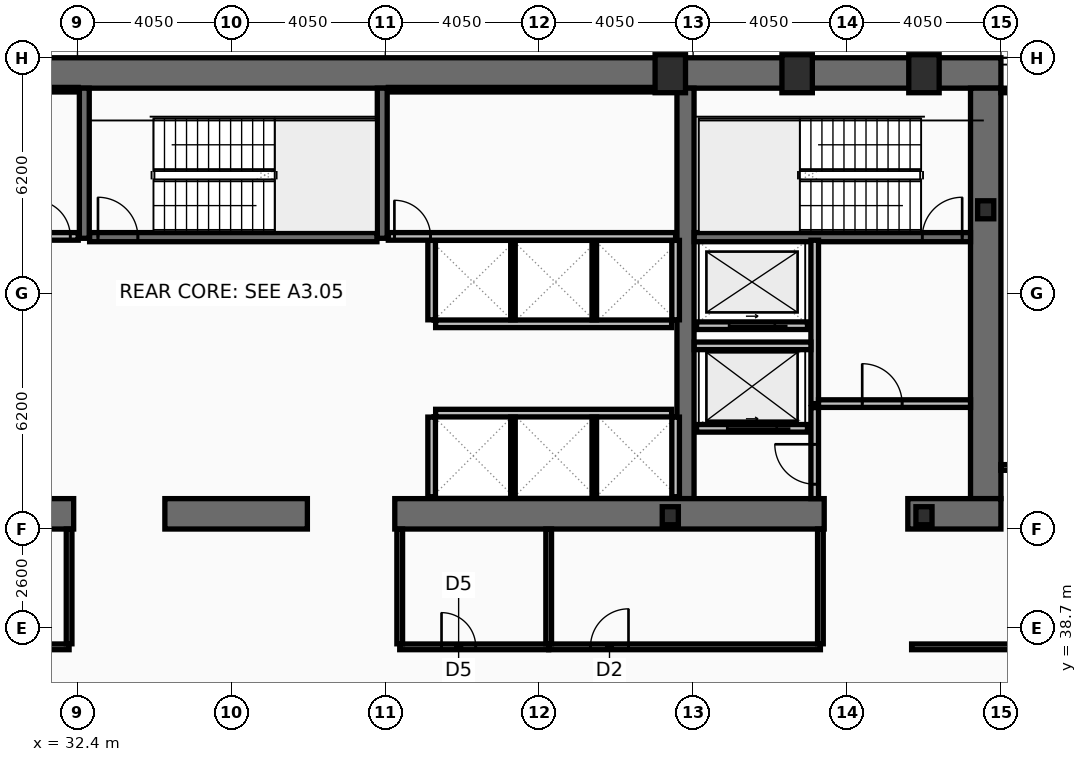
"""IFC4 building model, lengths in metres.
Left out: names, types, materials, properties, quantities, classifications, styles, units other than length and angle.
Written with IfcOpenShell. Run it as: python <this file> out.ifc"""

import sys

from ifc_helpers import new_model, si_unit, direction, frame, frame_2d, origin, origin_2d, place, context, subcontext, project, spatial, rectangle, hollow_rectangle, i_section, extrude, element, fill, save


model = new_model("IFC4")
c1 = context("Model", 3, precision=1e-05, world=origin(), true_north=direction((0.0, 1.0)))
c2 = subcontext(c1, "Body", "Model", "MODEL_VIEW")
j1 = project(units=[si_unit("LENGTHUNIT", "METRE"), si_unit("PLANEANGLEUNIT", "RADIAN")], contexts=[c1])
p1 = place(None, origin())
s1 = spatial("IfcSite", under=j1, at=p1, CompositionType="ELEMENT")
p2 = place(p1, origin())
s2 = spatial("IfcBuilding", under=s1, at=p2, CompositionType="ELEMENT")
p3 = place(p2, frame((0.0, 0.0, 29.8)))
s3 = spatial("IfcBuildingStorey", under=s2, at=p3, CompositionType="ELEMENT", Elevation=29.8)
p4 = place(p3, frame((16.2, 53.3, 0.0), z_axis=(0.0, 0.0, 1.0), x_axis=(1.0, 0.0, 0.0)))
e1 = element("IfcWall", 1, at=p4, inside=s3, PredefinedType="SHEAR", context=c2, shape_type="SweptSolid", body=[
    extrude(rectangle(XDim=40.5, YDim=0.8, at=frame_2d((20.25, 0.0))), origin(), (0.0, 0.0, 1.0), 3.82),
])
p5 = place(p3, frame((56.3, 52.9, 0.0), z_axis=(0.0, 0.0, 1.0), x_axis=(0.0, -1.0, 0.0)))
e2 = element("IfcWall", 2, at=p5, inside=s3, PredefinedType="SHEAR", context=c2, shape_type="SweptSolid", body=[
    extrude(rectangle(XDim=10.8, YDim=0.8, at=frame_2d((5.4, 0.0))), origin(), (0.0, 0.0, 1.0), 3.82),
])
p6 = place(p3, frame((48.4, 42.1, 0.0), z_axis=(0.0, 0.0, 1.0), x_axis=(0.0, 1.0, 0.0)))
e3 = element("IfcWall", 3, at=p6, inside=s3, PredefinedType="SHEAR", context=c2, shape_type="SweptSolid", body=[
    extrude(rectangle(XDim=10.8, YDim=0.45, at=frame_2d((5.4, 0.0))), origin(), (0.0, 0.0, 1.0), 3.82),
])
p7 = place(p3, frame((32.3, 41.7, 0.0), z_axis=(0.0, 0.0, 1.0), x_axis=(-1.0, 0.0, 0.0)))
e4 = element("IfcWall", 4, at=p7, inside=s3, PredefinedType="SHEAR", context=c2, shape_type="SweptSolid", body=[
    extrude(rectangle(XDim=11.45, YDim=0.8, at=frame_2d((5.725, 0.0))), origin(), (0.0, 0.0, 1.0), 3.82),
])
p8 = place(p3, frame((38.45, 41.7, 0.0), z_axis=(0.0, 0.0, 1.0), x_axis=(-1.0, 0.0, 0.0)))
e5 = element("IfcWall", 5, at=p8, inside=s3, PredefinedType="SHEAR", context=c2, shape_type="SweptSolid", body=[
    extrude(rectangle(XDim=3.75, YDim=0.8, at=frame_2d((1.875, 0.0))), origin(), (0.0, 0.0, 1.0), 3.82),
])
p9 = place(p3, frame((52.05, 41.7, 0.0), z_axis=(0.0, 0.0, 1.0), x_axis=(-1.0, 0.0, 0.0)))
e6 = element("IfcWall", 6, at=p9, inside=s3, PredefinedType="SHEAR", context=c2, shape_type="SweptSolid", body=[
    extrude(rectangle(XDim=11.3, YDim=0.8, at=frame_2d((5.65, 0.0))), origin(), (0.0, 0.0, 1.0), 3.82),
])
p10 = place(p3, frame((56.7, 41.7, 0.0), z_axis=(0.0, 0.0, 1.0), x_axis=(-1.0, 0.0, 0.0)))
e7 = element("IfcWall", 7, at=p10, inside=s3, PredefinedType="SHEAR", context=c2, shape_type="SweptSolid", body=[
    extrude(rectangle(XDim=2.45, YDim=0.8, at=frame_2d((1.225, 0.0))), origin(), (0.0, 0.0, 1.0), 3.82),
])
for number, where, z_axis, x_axis in (
    (8, (32.58, 48.95, 0.0), (0.0, 0.0, 1.0), (0.0, 1.0, 0.0)),
    (9, (40.42, 48.95, 0.0), (0.0, 0.0, 1.0), (0.0, 1.0, 0.0)),
):
    element("IfcWall", number, at=place(p3, frame(where, z_axis=z_axis, x_axis=x_axis)), inside=s3, PredefinedType="SHEAR", context=c2, shape_type="SweptSolid", body=[
        extrude(rectangle(XDim=3.95, YDim=0.26, at=frame_2d((1.975, 0.0))), origin(), (0.0, 0.0, 1.0), 3.82),
    ])
p11 = place(p3, frame((48.63, 48.98, 0.0), z_axis=(0.0, 0.0, 1.0), x_axis=(1.0, 0.0, 0.0)))
e10 = element("IfcWall", 10, at=p11, inside=s3, PredefinedType="SHEAR", context=c2, shape_type="SweptSolid", body=[
    extrude(rectangle(XDim=7.27, YDim=0.24, at=frame_2d((3.635, 0.0))), origin(), (0.0, 0.0, 1.0), 3.82),
])
p12 = place(p11, frame((6.0, 0.0, 0.0)))
e11 = element("IfcOpeningElement", 11, at=p12, cuts=e10, PredefinedType="OPENING", context=c2, shape_type="SweptSolid", body=[
    extrude(rectangle(XDim=1.05, YDim=2.15, at=frame_2d((0.525, 1.075))), frame((0.0, 0.13, 0.0), z_axis=(0.0, -1.0, 0.0), x_axis=(1.0, 0.0, 0.0)), (0.0, 0.0, 1.0), 0.26),
])
p13 = place(p3, frame((32.72, 48.98, 0.0), z_axis=(0.0, 0.0, 1.0), x_axis=(1.0, 0.0, 0.0)))
e12 = element("IfcWall", 12, at=p13, inside=s3, PredefinedType="SHEAR", context=c2, shape_type="SweptSolid", body=[
    extrude(rectangle(XDim=7.56, YDim=0.24, at=frame_2d((3.78, 0.0))), origin(), (0.0, 0.0, 1.0), 3.82),
])
p14 = place(p13, frame((0.22, 0.0, 0.0)))
e13 = element("IfcOpeningElement", 13, at=p14, cuts=e12, PredefinedType="OPENING", context=c2, shape_type="SweptSolid", body=[
    extrude(rectangle(XDim=1.05, YDim=2.15, at=frame_2d((0.525, 1.075))), frame((0.0, 0.13, 0.0), z_axis=(0.0, -1.0, 0.0), x_axis=(1.0, 0.0, 0.0)), (0.0, 0.0, 1.0), 0.26),
])
for number, where, z_axis, x_axis in (
    (14, (48.0, 53.28, 0.0), (0.0, 0.0, 1.0), (1.0, 0.0, 0.0)),
    (15, (51.337, 53.28, 0.0), (0.0, 0.0, 1.0), (1.0, 0.0, 0.0)),
    (16, (54.675, 53.28, 0.0), (0.0, 0.0, 1.0), (1.0, 0.0, 0.0)),
):
    element("IfcColumn", number, at=place(p3, frame(where, z_axis=z_axis, x_axis=x_axis)), inside=s3, PredefinedType="COLUMN", context=c2, shape_type="SweptSolid", body=[
        extrude(hollow_rectangle(XDim=0.8, YDim=1.0, WallThickness=0.055, at=origin_2d()), origin(), (0.0, 0.0, 1.0), 4.0),
    ])
for number, where, z_axis, x_axis in (
    (17, (56.3, 49.7, 0.0), (0.0, 0.0, 1.0), (1.0, 0.0, 0.0)),
    (18, (48.0, 41.65, 0.0), (0.0, 0.0, 1.0), (1.0, 0.0, 0.0)),
    (19, (54.675, 41.65, 0.0), (0.0, 0.0, 1.0), (1.0, 0.0, 0.0)),
):
    element("IfcColumn", number, at=place(p3, frame(where, z_axis=z_axis, x_axis=x_axis)), inside=s3, PredefinedType="COLUMN", context=c2, shape_type="SweptSolid", body=[
        extrude(i_section(OverallWidth=0.424, OverallDepth=0.474, WebThickness=0.048, FlangeThickness=0.077, at=origin_2d()), origin(), (0.0, 0.0, 1.0), 4.0),
    ])
p15 = place(p3, frame((51.61, 43.95, 0.0), z_axis=(0.0, 0.0, 1.0), x_axis=(-1.0, 0.0, 0.0)))
e20 = element("IfcWall", 20, at=p15, inside=s3, PredefinedType="PARTITIONING", context=c2, shape_type="SweptSolid", body=[
    extrude(rectangle(XDim=2.92, YDim=0.2, at=frame_2d((1.46, 0.0))), origin(), (0.0, 0.0, 1.0), 3.82),
])
p16 = place(p15, frame((0.81, 0.0, 0.0)))
e21 = element("IfcOpeningElement", 21, at=p16, cuts=e20, PredefinedType="OPENING", context=c2, shape_type="SweptSolid", body=[
    extrude(rectangle(XDim=1.3, YDim=2.18, at=frame_2d((0.65, 1.09))), frame((0.0, 0.11, 0.0), z_axis=(0.0, -1.0, 0.0), x_axis=(1.0, 0.0, 0.0)), (0.0, 0.0, 1.0), 0.22),
])
p17 = place(p3, frame((51.61, 46.65, 0.0), z_axis=(0.0, 0.0, 1.0), x_axis=(-1.0, 0.0, 0.0)))
e22 = element("IfcWall", 22, at=p17, inside=s3, PredefinedType="PARTITIONING", context=c2, shape_type="SweptSolid", body=[
    extrude(rectangle(XDim=2.92, YDim=0.2, at=frame_2d((1.46, 0.0))), origin(), (0.0, 0.0, 1.0), 3.82),
])
p18 = place(p17, frame((0.86, 0.0, 0.0)))
e23 = element("IfcOpeningElement", 23, at=p18, cuts=e22, PredefinedType="OPENING", context=c2, shape_type="SweptSolid", body=[
    extrude(rectangle(XDim=1.2, YDim=2.18, at=frame_2d((0.6, 1.09))), frame((0.0, 0.11, 0.0), z_axis=(0.0, -1.0, 0.0), x_axis=(1.0, 0.0, 0.0)), (0.0, 0.0, 1.0), 0.22),
])
p19 = place(p3, frame((51.8, 44.6, 0.0), z_axis=(0.0, 0.0, 1.0), x_axis=(0.0, 1.0, 0.0)))
e24 = element("IfcWall", 24, at=p19, inside=s3, PredefinedType="PARTITIONING", context=c2, shape_type="SweptSolid", body=[
    extrude(rectangle(XDim=4.3, YDim=0.2, at=frame_2d((2.15, 0.0))), origin(), (0.0, 0.0, 1.0), 3.82),
])
p20 = place(p3, frame((51.9, 44.6, 0.0), z_axis=(0.0, 0.0, 1.0), x_axis=(1.0, 0.0, 0.0)))
e25 = element("IfcWall", 25, at=p20, inside=s3, PredefinedType="PARTITIONING", context=c2, shape_type="SweptSolid", body=[
    extrude(rectangle(XDim=4.0, YDim=0.2, at=frame_2d((2.0, 0.0))), origin(), (0.0, 0.0, 1.0), 3.82),
])
p21 = place(p20, frame((1.15, 0.0, 0.0)))
e26 = element("IfcOpeningElement", 26, at=p21, cuts=e25, PredefinedType="OPENING", context=c2, shape_type="SweptSolid", body=[
    extrude(rectangle(XDim=1.05, YDim=2.15, at=frame_2d((0.525, 1.075))), frame((0.0, 0.11, 0.0), z_axis=(0.0, -1.0, 0.0), x_axis=(1.0, 0.0, 0.0)), (0.0, 0.0, 1.0), 0.22),
])
p22 = place(p3, frame((48.63, 46.12, 0.0), z_axis=(0.0, 0.0, 1.0), x_axis=(1.0, 0.0, 0.0)))
e27 = element("IfcWall", 27, at=p22, inside=s3, PredefinedType="PARTITIONING", context=c2, shape_type="SweptSolid", body=[
    extrude(rectangle(XDim=3.07, YDim=0.2, at=frame_2d((1.535, 0.0))), origin(), (0.0, 0.0, 1.0), 3.82),
])
p23 = place(p3, frame((51.8, 42.1, 0.0), z_axis=(0.0, 0.0, 1.0), x_axis=(0.0, 1.0, 0.0)))
e28 = element("IfcWall", 28, at=p23, inside=s3, PredefinedType="PARTITIONING", context=c2, shape_type="SweptSolid", body=[
    extrude(rectangle(XDim=2.395, YDim=0.2, at=frame_2d((1.198, 0.0))), origin(), (0.0, 0.0, 1.0), 3.82),
])
p24 = place(p23, frame((0.38, 0.0, 0.0)))
e29 = element("IfcOpeningElement", 29, at=p24, cuts=e28, PredefinedType="OPENING", context=c2, shape_type="SweptSolid", body=[
    extrude(rectangle(XDim=1.05, YDim=2.15, at=frame_2d((0.525, 1.075))), frame((0.0, 0.11, 0.0), z_axis=(0.0, -1.0, 0.0), x_axis=(1.0, 0.0, 0.0)), (0.0, 0.0, 1.0), 0.22),
])
p25 = place(p3, frame((41.825, 46.7, 0.0), z_axis=(0.0, 0.0, 1.0), x_axis=(1.0, 0.0, 0.0)))
e30 = element("IfcWall", 30, at=p25, inside=s3, PredefinedType="PARTITIONING", context=c2, shape_type="SweptSolid", body=[
    extrude(rectangle(XDim=6.21, YDim=0.2, at=frame_2d((3.105, 0.0))), origin(), (0.0, 0.0, 1.0), 3.82),
])
for number, where, z_axis, x_axis in (
    (31, (41.72, 46.805, 0.0), (0.0, 0.0, 1.0), (0.0, 1.0, 0.0)),
    (32, (48.14, 46.805, 0.0), (0.0, 0.0, 1.0), (0.0, 1.0, 0.0)),
):
    element("IfcWall", number, at=place(p3, frame(where, z_axis=z_axis, x_axis=x_axis)), inside=s3, PredefinedType="PARTITIONING", context=c2, shape_type="SweptSolid", body=[
        extrude(rectangle(XDim=2.09, YDim=0.2, at=frame_2d((1.045, 0.0))), origin(), (0.0, 0.0, 1.0), 3.82),
    ])
for number, where, z_axis, x_axis in (
    (33, (43.86, 46.805, 0.0), (0.0, 0.0, 1.0), (0.0, 1.0, 0.0)),
    (34, (46.0, 46.805, 0.0), (0.0, 0.0, 1.0), (0.0, 1.0, 0.0)),
):
    element("IfcWall", number, at=place(p3, frame(where, z_axis=z_axis, x_axis=x_axis)), inside=s3, PredefinedType="PARTITIONING", context=c2, shape_type="SweptSolid", body=[
        extrude(rectangle(XDim=2.09, YDim=0.12, at=frame_2d((1.045, 0.0))), origin(), (0.0, 0.0, 1.0), 3.82),
    ])
p26 = place(p3, frame((41.825, 44.35, 0.0), z_axis=(0.0, 0.0, 1.0), x_axis=(1.0, 0.0, 0.0)))
e35 = element("IfcWall", 35, at=p26, inside=s3, PredefinedType="PARTITIONING", context=c2, shape_type="SweptSolid", body=[
    extrude(rectangle(XDim=6.21, YDim=0.2, at=frame_2d((3.105, 0.0))), origin(), (0.0, 0.0, 1.0), 3.82),
])
for number, where, z_axis, x_axis in (
    (36, (41.72, 42.15, 0.0), (0.0, 0.0, 1.0), (0.0, 1.0, 0.0)),
    (37, (48.14, 42.15, 0.0), (0.0, 0.0, 1.0), (0.0, 1.0, 0.0)),
):
    element("IfcWall", number, at=place(p3, frame(where, z_axis=z_axis, x_axis=x_axis)), inside=s3, PredefinedType="PARTITIONING", context=c2, shape_type="SweptSolid", body=[
        extrude(rectangle(XDim=2.095, YDim=0.2, at=frame_2d((1.048, 0.0))), origin(), (0.0, 0.0, 1.0), 3.82),
    ])
for number, where, z_axis, x_axis in (
    (38, (43.86, 42.15, 0.0), (0.0, 0.0, 1.0), (0.0, 1.0, 0.0)),
    (39, (46.0, 42.15, 0.0), (0.0, 0.0, 1.0), (0.0, 1.0, 0.0)),
):
    element("IfcWall", number, at=place(p3, frame(where, z_axis=z_axis, x_axis=x_axis)), inside=s3, PredefinedType="PARTITIONING", context=c2, shape_type="SweptSolid", body=[
        extrude(rectangle(XDim=2.095, YDim=0.12, at=frame_2d((1.048, 0.0))), origin(), (0.0, 0.0, 1.0), 3.82),
    ])
p27 = place(p3, frame((24.7, 52.86, 0.0), z_axis=(0.0, 0.0, 1.0), x_axis=(1.0, 0.0, 0.0)))
e40 = element("IfcWall", 40, at=p27, inside=s3, PredefinedType="PARTITIONING", context=c2, shape_type="SweptSolid", body=[
    extrude(rectangle(XDim=7.72, YDim=0.12, at=frame_2d((3.86, 0.0))), origin(), (0.0, 0.0, 1.0), 3.82),
])
p28 = place(p3, frame((24.7, 49.0, 0.0), z_axis=(0.0, 0.0, 1.0), x_axis=(1.0, 0.0, 0.0)))
e41 = element("IfcWall", 41, at=p28, inside=s3, PredefinedType="PARTITIONING", context=c2, shape_type="SweptSolid", body=[
    extrude(rectangle(XDim=7.72, YDim=0.2, at=frame_2d((3.86, 0.0))), origin(), (0.0, 0.0, 1.0), 3.82),
])
p29 = place(p28, frame((6.56, 0.0, 0.0)))
e42 = element("IfcOpeningElement", 42, at=p29, cuts=e41, PredefinedType="OPENING", context=c2, shape_type="SweptSolid", body=[
    extrude(rectangle(XDim=0.95, YDim=2.1, at=frame_2d((0.475, 1.05))), frame((0.0, 0.11, 0.0), z_axis=(0.0, -1.0, 0.0), x_axis=(1.0, 0.0, 0.0)), (0.0, 0.0, 1.0), 0.22),
])
p30 = place(p3, frame((40.58, 52.86, 0.0), z_axis=(0.0, 0.0, 1.0), x_axis=(1.0, 0.0, 0.0)))
e43 = element("IfcWall", 43, at=p30, inside=s3, PredefinedType="PARTITIONING", context=c2, shape_type="SweptSolid", body=[
    extrude(rectangle(XDim=7.56, YDim=0.12, at=frame_2d((3.78, 0.0))), origin(), (0.0, 0.0, 1.0), 3.82),
])
p31 = place(p3, frame((40.58, 49.0, 0.0), z_axis=(0.0, 0.0, 1.0), x_axis=(1.0, 0.0, 0.0)))
e44 = element("IfcWall", 44, at=p31, inside=s3, PredefinedType="PARTITIONING", context=c2, shape_type="SweptSolid", body=[
    extrude(rectangle(XDim=7.56, YDim=0.2, at=frame_2d((3.78, 0.0))), origin(), (0.0, 0.0, 1.0), 3.82),
])
p32 = place(p31, frame((0.16, 0.0, 0.0)))
e45 = element("IfcOpeningElement", 45, at=p32, cuts=e44, PredefinedType="OPENING", context=c2, shape_type="SweptSolid", body=[
    extrude(rectangle(XDim=0.95, YDim=2.1, at=frame_2d((0.475, 1.05))), frame((0.0, 0.11, 0.0), z_axis=(0.0, -1.0, 0.0), x_axis=(1.0, 0.0, 0.0)), (0.0, 0.0, 1.0), 0.22),
])
p33 = place(p3, frame((28.4, 38.2, 0.0), z_axis=(0.0, 0.0, 1.0), x_axis=(1.0, 0.0, 0.0)))
e46 = element("IfcWall", 46, at=p33, inside=s3, PredefinedType="PARTITIONING", context=c2, shape_type="SweptSolid", body=[
    extrude(rectangle(XDim=3.78, YDim=0.15, at=frame_2d((1.89, 0.0))), origin(), (0.0, 0.0, 1.0), 3.01),
])
p34 = place(p33, frame((0.7, 0.0, 0.0)))
e47 = element("IfcOpeningElement", 47, at=p34, cuts=e46, PredefinedType="OPENING", context=c2, shape_type="SweptSolid", body=[
    extrude(rectangle(XDim=0.95, YDim=2.05, at=frame_2d((0.475, 1.025))), frame((0.0, 0.085, 0.0), z_axis=(0.0, -1.0, 0.0), x_axis=(1.0, 0.0, 0.0)), (0.0, 0.0, 1.0), 0.17),
])
p35 = place(p3, frame((32.18, 38.28, 0.0), z_axis=(0.0, 0.0, 1.0), x_axis=(0.0, 1.0, 0.0)))
e48 = element("IfcWall", 48, at=p35, inside=s3, PredefinedType="PARTITIONING", context=c2, shape_type="SweptSolid", body=[
    extrude(rectangle(XDim=3.02, YDim=0.15, at=frame_2d((1.51, 0.0))), origin(), (0.0, 0.0, 1.0), 3.82),
])
p36 = place(p3, frame((40.88, 38.2, 0.0), z_axis=(0.0, 0.0, 1.0), x_axis=(1.0, 0.0, 0.0)))
e49 = element("IfcWall", 49, at=p36, inside=s3, PredefinedType="PARTITIONING", context=c2, shape_type="SweptSolid", body=[
    extrude(rectangle(XDim=3.92, YDim=0.15, at=frame_2d((1.96, 0.0))), origin(), (0.0, 0.0, 1.0), 3.01),
])
p37 = place(p36, frame((1.1, 0.0, 0.0)))
e50 = element("IfcOpeningElement", 50, at=p37, cuts=e49, PredefinedType="OPENING", context=c2, shape_type="SweptSolid", body=[
    extrude(rectangle(XDim=0.9, YDim=2.05, at=frame_2d((0.45, 1.025))), frame((0.0, 0.085, 0.0), z_axis=(0.0, -1.0, 0.0), x_axis=(1.0, 0.0, 0.0)), (0.0, 0.0, 1.0), 0.17),
])
p38 = place(p3, frame((44.8, 38.2, 0.0), z_axis=(0.0, 0.0, 1.0), x_axis=(1.0, 0.0, 0.0)))
e51 = element("IfcWall", 51, at=p38, inside=s3, PredefinedType="PARTITIONING", context=c2, shape_type="SweptSolid", body=[
    extrude(rectangle(XDim=7.15, YDim=0.15, at=frame_2d((3.575, 0.0))), origin(), (0.0, 0.0, 1.0), 3.01),
])
p39 = place(p38, frame((1.1, 0.0, 0.0)))
e52 = element("IfcOpeningElement", 52, at=p39, cuts=e51, PredefinedType="OPENING", context=c2, shape_type="SweptSolid", body=[
    extrude(rectangle(XDim=1.0, YDim=2.05, at=frame_2d((0.5, 1.025))), frame((0.0, 0.085, 0.0), z_axis=(0.0, -1.0, 0.0), x_axis=(1.0, 0.0, 0.0)), (0.0, 0.0, 1.0), 0.17),
])
for number, where, z_axis, x_axis in (
    (53, (40.88, 38.28, 0.0), (0.0, 0.0, 1.0), (0.0, 1.0, 0.0)),
    (54, (44.8, 38.28, 0.0), (0.0, 0.0, 1.0), (0.0, 1.0, 0.0)),
    (55, (51.95, 38.28, 0.0), (0.0, 0.0, 1.0), (0.0, 1.0, 0.0)),
):
    element("IfcWall", number, at=place(p3, frame(where, z_axis=z_axis, x_axis=x_axis)), inside=s3, PredefinedType="PARTITIONING", context=c2, shape_type="SweptSolid", body=[
        extrude(rectangle(XDim=3.02, YDim=0.15, at=frame_2d((1.51, 0.0))), origin(), (0.0, 0.0, 1.0), 3.82),
    ])
p40 = place(p3, frame((54.35, 38.2, 0.0), z_axis=(0.0, 0.0, 1.0), x_axis=(1.0, 0.0, 0.0)))
e56 = element("IfcWall", 56, at=p40, inside=s3, PredefinedType="PARTITIONING", context=c2, shape_type="SweptSolid", body=[
    extrude(rectangle(XDim=16.52, YDim=0.15, at=frame_2d((8.26, 0.0))), origin(), (0.0, 0.0, 1.0), 3.01),
])
p41 = place(p40, frame((3.25, 0.0, 0.0)))
e57 = element("IfcOpeningElement", 57, at=p41, cuts=e56, PredefinedType="OPENING", context=c2, shape_type="SweptSolid", body=[
    extrude(rectangle(XDim=0.95, YDim=2.05, at=frame_2d((0.475, 1.025))), frame((0.0, 0.085, 0.0), z_axis=(0.0, -1.0, 0.0), x_axis=(1.0, 0.0, 0.0)), (0.0, 0.0, 1.0), 0.17),
])
p42 = place(p3, frame((56.7, 42.92, 0.0), z_axis=(0.0, 0.0, 1.0), x_axis=(1.0, 0.0, 0.0)))
e58 = element("IfcWall", 58, at=p42, inside=s3, PredefinedType="PARTITIONING", context=c2, shape_type="SweptSolid", body=[
    extrude(rectangle(XDim=14.105, YDim=0.15, at=frame_2d((7.052, 0.0))), origin(), (0.0, 0.0, 1.0), 3.01),
])
p43 = place(p42, frame((0.9, 0.0, 0.0)))
e59 = element("IfcOpeningElement", 59, at=p43, cuts=e58, PredefinedType="OPENING", context=c2, shape_type="SweptSolid", body=[
    extrude(rectangle(XDim=0.9, YDim=2.05, at=frame_2d((0.45, 1.025))), frame((0.0, 0.085, 0.0), z_axis=(0.0, -1.0, 0.0), x_axis=(1.0, 0.0, 0.0)), (0.0, 0.0, 1.0), 0.17),
])
p44 = place(p3, frame((56.7, 52.84, 0.0), z_axis=(0.0, 0.0, 1.0), x_axis=(1.0, 0.0, 0.0)))
e60 = element("IfcWall", 60, at=p44, inside=s3, PredefinedType="PARTITIONING", context=c2, shape_type="SweptSolid", body=[
    extrude(rectangle(XDim=14.105, YDim=0.12, at=frame_2d((7.052, 0.0))), origin(), (0.0, 0.0, 1.0), 3.82),
])
p45 = place(p12, origin())
e61 = element("IfcDoor", 61, at=p45, inside=s3, OperationType="SINGLE_SWING_RIGHT", PredefinedType="DOOR", context=c2, shape_type="SweptSolid", body=[
    extrude(rectangle(XDim=1.05, YDim=2.15, at=frame_2d((0.525, 1.075))), frame((0.0, 0.025, 0.0), z_axis=(0.0, -1.0, 0.0), x_axis=(1.0, 0.0, 0.0)), (0.0, 0.0, 1.0), 0.05),
])
fill(e11, e61)
p46 = place(p14, origin())
e62 = element("IfcDoor", 62, at=p46, inside=s3, OperationType="SINGLE_SWING_LEFT", PredefinedType="DOOR", context=c2, shape_type="SweptSolid", body=[
    extrude(rectangle(XDim=1.05, YDim=2.15, at=frame_2d((0.525, 1.075))), frame((0.0, 0.025, 0.0), z_axis=(0.0, -1.0, 0.0), x_axis=(1.0, 0.0, 0.0)), (0.0, 0.0, 1.0), 0.05),
])
fill(e13, e62)
p47 = place(p16, origin())
e63 = element("IfcDoor", 63, at=p47, inside=s3, OperationType="SLIDING_TO_LEFT", PredefinedType="DOOR", context=c2, shape_type="SweptSolid", body=[
    extrude(rectangle(XDim=1.3, YDim=2.18, at=frame_2d((0.65, 1.09))), frame((0.0, 0.025, 0.0), z_axis=(0.0, -1.0, 0.0), x_axis=(1.0, 0.0, 0.0)), (0.0, 0.0, 1.0), 0.05),
])
fill(e21, e63)
p48 = place(p18, origin())
e64 = element("IfcDoor", 64, at=p48, inside=s3, OperationType="SLIDING_TO_LEFT", PredefinedType="DOOR", context=c2, shape_type="SweptSolid", body=[
    extrude(rectangle(XDim=1.2, YDim=2.18, at=frame_2d((0.6, 1.09))), frame((0.0, 0.025, 0.0), z_axis=(0.0, -1.0, 0.0), x_axis=(1.0, 0.0, 0.0)), (0.0, 0.0, 1.0), 0.05),
])
fill(e23, e64)
p49 = place(p21, origin())
e65 = element("IfcDoor", 65, at=p49, inside=s3, OperationType="SINGLE_SWING_LEFT", PredefinedType="DOOR", context=c2, shape_type="SweptSolid", body=[
    extrude(rectangle(XDim=1.05, YDim=2.15, at=frame_2d((0.525, 1.075))), frame((0.0, 0.025, 0.0), z_axis=(0.0, -1.0, 0.0), x_axis=(1.0, 0.0, 0.0)), (0.0, 0.0, 1.0), 0.05),
])
fill(e26, e65)
p50 = place(p24, origin())
e66 = element("IfcDoor", 66, at=p50, inside=s3, OperationType="SINGLE_SWING_RIGHT", PredefinedType="DOOR", context=c2, shape_type="SweptSolid", body=[
    extrude(rectangle(XDim=1.05, YDim=2.15, at=frame_2d((0.525, 1.075))), frame((0.0, 0.025, 0.0), z_axis=(0.0, -1.0, 0.0), x_axis=(1.0, 0.0, 0.0)), (0.0, 0.0, 1.0), 0.05),
])
fill(e29, e66)
p51 = place(p29, origin())
e67 = element("IfcDoor", 67, at=p51, inside=s3, OperationType="SINGLE_SWING_LEFT", PredefinedType="DOOR", context=c2, shape_type="SweptSolid", body=[
    extrude(rectangle(XDim=0.95, YDim=2.1, at=frame_2d((0.475, 1.05))), frame((0.0, 0.025, 0.0), z_axis=(0.0, -1.0, 0.0), x_axis=(1.0, 0.0, 0.0)), (0.0, 0.0, 1.0), 0.05),
])
fill(e42, e67)
p52 = place(p32, origin())
e68 = element("IfcDoor", 68, at=p52, inside=s3, OperationType="SINGLE_SWING_LEFT", PredefinedType="DOOR", context=c2, shape_type="SweptSolid", body=[
    extrude(rectangle(XDim=0.95, YDim=2.1, at=frame_2d((0.475, 1.05))), frame((0.0, 0.025, 0.0), z_axis=(0.0, -1.0, 0.0), x_axis=(1.0, 0.0, 0.0)), (0.0, 0.0, 1.0), 0.05),
])
fill(e45, e68)
p53 = place(p37, origin())
e69 = element("IfcDoor", 69, at=p53, inside=s3, OperationType="SINGLE_SWING_LEFT", PredefinedType="DOOR", context=c2, shape_type="SweptSolid", body=[
    extrude(rectangle(XDim=0.9, YDim=2.05, at=frame_2d((0.45, 1.025))), frame((0.0, 0.025, 0.0), z_axis=(0.0, -1.0, 0.0), x_axis=(1.0, 0.0, 0.0)), (0.0, 0.0, 1.0), 0.05),
])
fill(e50, e69)
p54 = place(p39, origin())
e70 = element("IfcDoor", 70, at=p54, inside=s3, OperationType="SINGLE_SWING_RIGHT", PredefinedType="DOOR", context=c2, shape_type="SweptSolid", body=[
    extrude(rectangle(XDim=1.0, YDim=2.05, at=frame_2d((0.5, 1.025))), frame((0.0, 0.025, 0.0), z_axis=(0.0, -1.0, 0.0), x_axis=(1.0, 0.0, 0.0)), (0.0, 0.0, 1.0), 0.05),
])
fill(e52, e70)
save(model, sys.argv[1])
